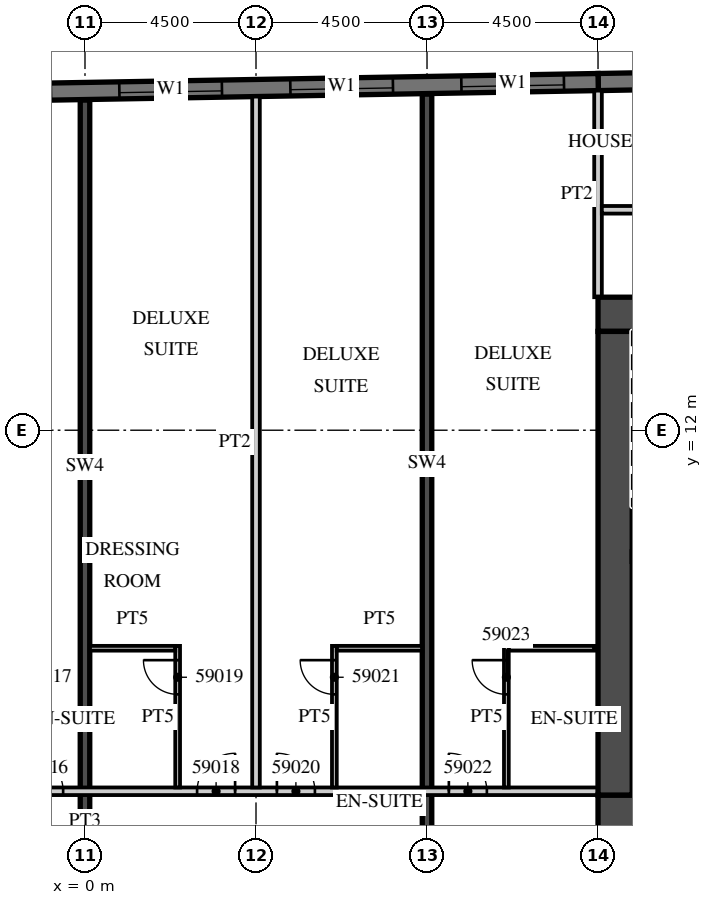
"""IFC4 building model, lengths in metres.
Left out: names, types, materials, properties, quantities, classifications, styles, units other than length and angle.
Written with IfcOpenShell. Run it as: python <this file> out.ifc"""

import sys

from ifc_helpers import new_model, si_unit, direction, frame, frame_2d, origin, place, context, subcontext, project, spatial, rectangle, extrude, element, fill, save


model = new_model("IFC4")
c1 = context("Model", 3, precision=1e-05, world=origin(), true_north=direction((0.0, 1.0)))
c2 = subcontext(c1, "Body", "Model", "MODEL_VIEW")
j1 = project(units=[si_unit("LENGTHUNIT", "METRE"), si_unit("PLANEANGLEUNIT", "RADIAN")], contexts=[c1])
p1 = place(None, origin())
s1 = spatial("IfcSite", under=j1, at=p1, CompositionType="ELEMENT")
p2 = place(p1, origin())
s2 = spatial("IfcBuilding", under=s1, at=p2, CompositionType="ELEMENT")
p3 = place(p2, frame((0.0, 0.0, 240.8)))
s3 = spatial("IfcBuildingStorey", under=s2, at=p3, CompositionType="ELEMENT", Elevation=240.8)
p4 = place(p3, frame((0.0, 1.4, 0.0), z_axis=(0.0, 0.0, 1.0), x_axis=(0.0, 1.0, 0.0)))
e1 = element("IfcWall", 1, at=p4, inside=s3, PredefinedType="SHEAR", context=c2, shape_type="SweptSolid", body=[
    extrude(rectangle(XDim=19.289, YDim=0.25, at=frame_2d((9.644, 0.0))), origin(), (0.0, 0.0, 1.0), 3.3),
])
p5 = place(p3, frame((9.0, 1.4, 0.0), z_axis=(0.0, 0.0, 1.0), x_axis=(0.0, 1.0, 0.0)))
e2 = element("IfcWall", 2, at=p5, inside=s3, PredefinedType="SHEAR", context=c2, shape_type="SweptSolid", body=[
    extrude(rectangle(XDim=19.446, YDim=0.25, at=frame_2d((9.723, 0.0))), origin(), (0.0, 0.0, 1.0), 3.3),
])
p6 = place(p3, frame((31.504, 21.476, 0.0), z_axis=(0.0, 0.0, 1.0), x_axis=(-0.999847677887, -0.017453395744, 0.0)))
e3 = element("IfcWall", 3, at=p6, inside=s3, PredefinedType="SOLIDWALL", context=c2, shape_type="SweptSolid", body=[
    extrude(rectangle(XDim=18.003, YDim=0.45, at=frame_2d((9.001, 0.0))), origin(), (0.0, 0.0, 1.0), 3.02),
])
p7 = place(p3, frame((13.504, 21.161, 0.0), z_axis=(0.0, 0.0, 1.0), x_axis=(-0.999847763257, -0.017448504532, 0.0)))
e4 = element("IfcWall", 4, at=p7, inside=s3, PredefinedType="SOLIDWALL", context=c2, shape_type="SweptSolid", body=[
    extrude(rectangle(XDim=46.859, YDim=0.45, at=frame_2d((23.43, 0.0))), origin(), (0.0, 0.0, 1.0), 3.02),
])
p8 = place(p7, frame((0.9, 0.0, 0.45)))
e5 = element("IfcOpeningElement", 5, at=p8, cuts=e4, PredefinedType="OPENING", context=c2, shape_type="SweptSolid", body=[
    extrude(rectangle(XDim=2.7, YDim=2.25, at=frame_2d((1.35, 1.125))), frame((0.0, 0.235, 0.0), z_axis=(0.0, -1.0, 0.0), x_axis=(1.0, 0.0, 0.0)), (0.0, 0.0, 1.0), 0.47),
])
p9 = place(p7, frame((5.401, 0.0, 0.45)))
e6 = element("IfcOpeningElement", 6, at=p9, cuts=e4, PredefinedType="OPENING", context=c2, shape_type="SweptSolid", body=[
    extrude(rectangle(XDim=2.7, YDim=2.25, at=frame_2d((1.35, 1.125))), frame((0.0, 0.235, 0.0), z_axis=(0.0, -1.0, 0.0), x_axis=(1.0, 0.0, 0.0)), (0.0, 0.0, 1.0), 0.47),
])
p10 = place(p7, frame((9.902, 0.0, 0.45)))
e7 = element("IfcOpeningElement", 7, at=p10, cuts=e4, PredefinedType="OPENING", context=c2, shape_type="SweptSolid", body=[
    extrude(rectangle(XDim=2.7, YDim=2.25, at=frame_2d((1.35, 1.125))), frame((0.0, 0.235, 0.0), z_axis=(0.0, -1.0, 0.0), x_axis=(1.0, 0.0, 0.0)), (0.0, 0.0, 1.0), 0.47),
])
p11 = place(p7, frame((14.402, 0.0, 0.45)))
e8 = element("IfcOpeningElement", 8, at=p11, cuts=e4, PredefinedType="OPENING", context=c2, shape_type="SweptSolid", body=[
    extrude(rectangle(XDim=2.7, YDim=2.25, at=frame_2d((1.35, 1.125))), frame((0.0, 0.235, 0.0), z_axis=(0.0, -1.0, 0.0), x_axis=(1.0, 0.0, 0.0)), (0.0, 0.0, 1.0), 0.47),
])
p12 = place(p7, frame((18.903, 0.0, 0.45)))
e9 = element("IfcOpeningElement", 9, at=p12, cuts=e4, PredefinedType="OPENING", context=c2, shape_type="SweptSolid", body=[
    extrude(rectangle(XDim=2.7, YDim=2.25, at=frame_2d((1.35, 1.125))), frame((0.0, 0.235, 0.0), z_axis=(0.0, -1.0, 0.0), x_axis=(1.0, 0.0, 0.0)), (0.0, 0.0, 1.0), 0.47),
])
p13 = place(p7, frame((23.404, 0.0, 0.45)))
e10 = element("IfcOpeningElement", 10, at=p13, cuts=e4, PredefinedType="OPENING", context=c2, shape_type="SweptSolid", body=[
    extrude(rectangle(XDim=2.7, YDim=2.25, at=frame_2d((1.35, 1.125))), frame((0.0, 0.235, 0.0), z_axis=(0.0, -1.0, 0.0), x_axis=(1.0, 0.0, 0.0)), (0.0, 0.0, 1.0), 0.47),
])
p14 = place(p7, frame((27.904, 0.0, 0.45)))
e11 = element("IfcOpeningElement", 11, at=p14, cuts=e4, PredefinedType="OPENING", context=c2, shape_type="SweptSolid", body=[
    extrude(rectangle(XDim=2.7, YDim=2.25, at=frame_2d((1.35, 1.125))), frame((0.0, 0.235, 0.0), z_axis=(0.0, -1.0, 0.0), x_axis=(1.0, 0.0, 0.0)), (0.0, 0.0, 1.0), 0.47),
])
p15 = place(p7, frame((32.405, 0.0, 0.45)))
e12 = element("IfcOpeningElement", 12, at=p15, cuts=e4, PredefinedType="OPENING", context=c2, shape_type="SweptSolid", body=[
    extrude(rectangle(XDim=2.7, YDim=2.25, at=frame_2d((1.35, 1.125))), frame((0.0, 0.235, 0.0), z_axis=(0.0, -1.0, 0.0), x_axis=(1.0, 0.0, 0.0)), (0.0, 0.0, 1.0), 0.47),
])
p16 = place(p7, frame((36.906, 0.0, 0.45)))
e13 = element("IfcOpeningElement", 13, at=p16, cuts=e4, PredefinedType="OPENING", context=c2, shape_type="SweptSolid", body=[
    extrude(rectangle(XDim=2.7, YDim=2.25, at=frame_2d((1.35, 1.125))), frame((0.0, 0.235, 0.0), z_axis=(0.0, -1.0, 0.0), x_axis=(1.0, 0.0, 0.0)), (0.0, 0.0, 1.0), 0.47),
])
p17 = place(p7, frame((41.406, 0.0, 0.45)))
e14 = element("IfcOpeningElement", 14, at=p17, cuts=e4, PredefinedType="OPENING", context=c2, shape_type="SweptSolid", body=[
    extrude(rectangle(XDim=2.7, YDim=2.25, at=frame_2d((1.35, 1.125))), frame((0.0, 0.235, 0.0), z_axis=(0.0, -1.0, 0.0), x_axis=(1.0, 0.0, 0.0)), (0.0, 0.0, 1.0), 0.47),
])
p18 = place(p3, frame((13.5, 15.5, 0.0), z_axis=(0.0, 0.0, 1.0), x_axis=(0.0, 1.0, 0.0)))
e15 = element("IfcWall", 15, at=p18, inside=s3, PredefinedType="PARTITIONING", context=c2, shape_type="SweptSolid", body=[
    extrude(rectangle(XDim=5.436, YDim=0.2, at=frame_2d((2.718, 0.0))), origin(), (0.0, 0.0, 1.0), 3.02),
])
p19 = place(p3, frame((-13.5, 2.5, 0.0), z_axis=(0.0, 0.0, 1.0), x_axis=(1.0, 0.0, 0.0)))
e16 = element("IfcWall", 16, at=p19, inside=s3, PredefinedType="PARTITIONING", context=c2, shape_type="SweptSolid", body=[
    extrude(rectangle(XDim=27.0, YDim=0.2, at=frame_2d((13.5, 0.0))), origin(), (0.0, 0.0, 1.0), 3.02),
])
p20 = place(p19, frame((2.925, 0.0, 0.0)))
e17 = element("IfcOpeningElement", 17, at=p20, cuts=e16, PredefinedType="OPENING", context=c2, shape_type="SweptSolid", body=[
    extrude(rectangle(XDim=1.0, YDim=2.1, at=frame_2d((0.5, 1.05))), frame((0.0, 0.11, 0.0), z_axis=(0.0, -1.0, 0.0), x_axis=(1.0, 0.0, 0.0)), (0.0, 0.0, 1.0), 0.22),
])
p21 = place(p19, frame((7.45, 0.0, 0.0)))
e18 = element("IfcOpeningElement", 18, at=p21, cuts=e16, PredefinedType="OPENING", context=c2, shape_type="SweptSolid", body=[
    extrude(rectangle(XDim=1.0, YDim=2.1, at=frame_2d((0.5, 1.05))), frame((0.0, 0.11, 0.0), z_axis=(0.0, -1.0, 0.0), x_axis=(1.0, 0.0, 0.0)), (0.0, 0.0, 1.0), 0.22),
])
p22 = place(p19, frame((11.925, 0.0, 0.0)))
e19 = element("IfcOpeningElement", 19, at=p22, cuts=e16, PredefinedType="OPENING", context=c2, shape_type="SweptSolid", body=[
    extrude(rectangle(XDim=1.0, YDim=2.1, at=frame_2d((0.5, 1.05))), frame((0.0, 0.11, 0.0), z_axis=(0.0, -1.0, 0.0), x_axis=(1.0, 0.0, 0.0)), (0.0, 0.0, 1.0), 0.22),
])
p23 = place(p19, frame((16.45, 0.0, 0.0)))
e20 = element("IfcOpeningElement", 20, at=p23, cuts=e16, PredefinedType="OPENING", context=c2, shape_type="SweptSolid", body=[
    extrude(rectangle(XDim=1.0, YDim=2.1, at=frame_2d((0.5, 1.05))), frame((0.0, 0.11, 0.0), z_axis=(0.0, -1.0, 0.0), x_axis=(1.0, 0.0, 0.0)), (0.0, 0.0, 1.0), 0.22),
])
p24 = place(p19, frame((18.55, 0.0, 0.0)))
e21 = element("IfcOpeningElement", 21, at=p24, cuts=e16, PredefinedType="OPENING", context=c2, shape_type="SweptSolid", body=[
    extrude(rectangle(XDim=1.0, YDim=2.1, at=frame_2d((0.5, 1.05))), frame((0.0, 0.11, 0.0), z_axis=(0.0, -1.0, 0.0), x_axis=(1.0, 0.0, 0.0)), (0.0, 0.0, 1.0), 0.22),
])
p25 = place(p19, frame((23.075, 0.0, 0.0)))
e22 = element("IfcOpeningElement", 22, at=p25, cuts=e16, PredefinedType="OPENING", context=c2, shape_type="SweptSolid", body=[
    extrude(rectangle(XDim=1.0, YDim=2.1, at=frame_2d((0.5, 1.05))), frame((0.0, 0.11, 0.0), z_axis=(0.0, -1.0, 0.0), x_axis=(1.0, 0.0, 0.0)), (0.0, 0.0, 1.0), 0.22),
])
p26 = place(p3, frame((4.5, 2.6, 0.0), z_axis=(0.0, 0.0, 1.0), x_axis=(0.0, 1.0, 0.0)))
e23 = element("IfcWall", 23, at=p26, inside=s3, PredefinedType="PARTITIONING", context=c2, shape_type="SweptSolid", body=[
    extrude(rectangle(XDim=18.179, YDim=0.2, at=frame_2d((9.089, 0.0))), origin(), (0.0, 0.0, 1.0), 3.02),
])
p27 = place(p3, frame((2.438, 2.6, 0.0), z_axis=(0.0, 0.0, 1.0), x_axis=(0.0, 1.0, 0.0)))
e24 = element("IfcWall", 24, at=p27, inside=s3, PredefinedType="PARTITIONING", context=c2, shape_type="SweptSolid", body=[
    extrude(rectangle(XDim=3.725, YDim=0.125, at=frame_2d((1.862, 0.0))), origin(), (0.0, 0.0, 1.0), 3.02),
])
p28 = place(p27, frame((2.45, 0.0, 0.0)))
e25 = element("IfcOpeningElement", 25, at=p28, cuts=e24, PredefinedType="OPENING", context=c2, shape_type="SweptSolid", body=[
    extrude(rectangle(XDim=0.9, YDim=2.1, at=frame_2d((0.45, 1.05))), frame((0.0, 0.073, 0.0), z_axis=(0.0, -1.0, 0.0), x_axis=(1.0, 0.0, 0.0)), (0.0, 0.0, 1.0), 0.145),
])
p29 = place(p3, frame((0.125, 6.263, 0.0), z_axis=(0.0, 0.0, 1.0), x_axis=(1.0, 0.0, 0.0)))
e26 = element("IfcWall", 26, at=p29, inside=s3, PredefinedType="PARTITIONING", context=c2, shape_type="SweptSolid", body=[
    extrude(rectangle(XDim=2.25, YDim=0.125, at=frame_2d((1.125, 0.0))), origin(), (0.0, 0.0, 1.0), 3.02),
])
p30 = place(p3, frame((6.562, 2.6, 0.0), z_axis=(0.0, 0.0, 1.0), x_axis=(0.0, 1.0, 0.0)))
e27 = element("IfcWall", 27, at=p30, inside=s3, PredefinedType="PARTITIONING", context=c2, shape_type="SweptSolid", body=[
    extrude(rectangle(XDim=3.725, YDim=0.125, at=frame_2d((1.862, 0.0))), origin(), (0.0, 0.0, 1.0), 3.02),
])
p31 = place(p30, frame((2.45, 0.0, 0.0)))
e28 = element("IfcOpeningElement", 28, at=p31, cuts=e27, PredefinedType="OPENING", context=c2, shape_type="SweptSolid", body=[
    extrude(rectangle(XDim=0.9, YDim=2.1, at=frame_2d((0.45, 1.05))), frame((0.0, 0.073, 0.0), z_axis=(0.0, -1.0, 0.0), x_axis=(1.0, 0.0, 0.0)), (0.0, 0.0, 1.0), 0.145),
])
p32 = place(p3, frame((6.625, 6.263, 0.0), z_axis=(0.0, 0.0, 1.0), x_axis=(1.0, 0.0, 0.0)))
e29 = element("IfcWall", 29, at=p32, inside=s3, PredefinedType="PARTITIONING", context=c2, shape_type="SweptSolid", body=[
    extrude(rectangle(XDim=2.25, YDim=0.125, at=frame_2d((1.125, 0.0))), origin(), (0.0, 0.0, 1.0), 3.02),
])
p33 = place(p3, frame((11.088, 2.6, 0.0), z_axis=(0.0, 0.0, 1.0), x_axis=(0.0, 1.0, 0.0)))
e30 = element("IfcWall", 30, at=p33, inside=s3, PredefinedType="PARTITIONING", context=c2, shape_type="SweptSolid", body=[
    extrude(rectangle(XDim=3.725, YDim=0.125, at=frame_2d((1.862, 0.0))), origin(), (0.0, 0.0, 1.0), 3.02),
])
p34 = place(p33, frame((2.45, 0.0, 0.0)))
e31 = element("IfcOpeningElement", 31, at=p34, cuts=e30, PredefinedType="OPENING", context=c2, shape_type="SweptSolid", body=[
    extrude(rectangle(XDim=0.9, YDim=2.1, at=frame_2d((0.45, 1.05))), frame((0.0, 0.073, 0.0), z_axis=(0.0, -1.0, 0.0), x_axis=(1.0, 0.0, 0.0)), (0.0, 0.0, 1.0), 0.145),
])
p35 = place(p3, frame((11.15, 6.263, 0.0), z_axis=(0.0, 0.0, 1.0), x_axis=(1.0, 0.0, 0.0)))
e32 = element("IfcWall", 32, at=p35, inside=s3, PredefinedType="PARTITIONING", context=c2, shape_type="SweptSolid", body=[
    extrude(rectangle(XDim=2.25, YDim=0.125, at=frame_2d((1.125, 0.0))), origin(), (0.0, 0.0, 1.0), 3.02),
])
p36 = place(p3, frame((13.5, 1.95, 0.0), z_axis=(0.0, 0.0, 1.0), x_axis=(1.0, 0.0, 0.0)))
e33 = element("IfcWall", 33, at=p36, inside=s3, PredefinedType="SHEAR", context=c2, shape_type="SweptSolid", body=[
    extrude(rectangle(XDim=18.0, YDim=0.9, at=frame_2d((9.0, 0.0))), origin(), (0.0, 0.0, 1.0), 3.02),
])
p37 = place(p36, frame((1.475, 0.0, 0.0)))
e34 = element("IfcOpeningElement", 34, at=p37, cuts=e33, PredefinedType="OPENING", context=c2, shape_type="SweptSolid", body=[
    extrude(rectangle(XDim=1.8, YDim=2.1, at=frame_2d((0.9, 1.05))), frame((0.0, 0.46, 0.0), z_axis=(0.0, -1.0, 0.0), x_axis=(1.0, 0.0, 0.0)), (0.0, 0.0, 1.0), 0.92),
])
p38 = place(p3, frame((13.5, 15.05, 0.0), z_axis=(0.0, 0.0, 1.0), x_axis=(1.0, 0.0, 0.0)))
e35 = element("IfcWall", 35, at=p38, inside=s3, PredefinedType="SHEAR", context=c2, shape_type="SweptSolid", body=[
    extrude(rectangle(XDim=6.8, YDim=0.9, at=frame_2d((3.4, 0.0))), origin(), (0.0, 0.0, 1.0), 3.02),
])
p39 = place(p38, frame((4.725, 0.0, 0.0)))
e36 = element("IfcOpeningElement", 36, at=p39, cuts=e35, PredefinedType="OPENING", context=c2, shape_type="SweptSolid", body=[
    extrude(rectangle(XDim=1.2, YDim=2.1, at=frame_2d((0.6, 1.05))), frame((0.0, 0.46, 0.0), z_axis=(0.0, -1.0, 0.0), x_axis=(1.0, 0.0, 0.0)), (0.0, 0.0, 1.0), 0.92),
])
p40 = place(p3, frame((13.95, 2.4, 0.0), z_axis=(0.0, 0.0, 1.0), x_axis=(0.0, 1.0, 0.0)))
e37 = element("IfcWall", 37, at=p40, inside=s3, PredefinedType="SHEAR", context=c2, shape_type="SweptSolid", body=[
    extrude(rectangle(XDim=12.2, YDim=0.9, at=frame_2d((6.1, 0.0))), origin(), (0.0, 0.0, 1.0), 3.02),
])
p41 = place(p3, frame((13.6, 17.8, 0.0), z_axis=(0.0, 0.0, 1.0), x_axis=(1.0, 0.0, 0.0)))
e38 = element("IfcWall", 38, at=p41, inside=s3, PredefinedType="PARTITIONING", context=c2, shape_type="SweptSolid", body=[
    extrude(rectangle(XDim=28.657, YDim=0.2, at=frame_2d((14.329, 0.0))), origin(), (0.0, 0.0, 1.0), 3.02),
])
p42 = place(p41, frame((17.812, 0.0, 0.0)))
e39 = element("IfcOpeningElement", 39, at=p42, cuts=e38, PredefinedType="OPENING", context=c2, shape_type="SweptSolid", body=[
    extrude(rectangle(XDim=0.9, YDim=2.1, at=frame_2d((0.45, 1.05))), frame((0.0, 0.11, 0.0), z_axis=(0.0, -1.0, 0.0), x_axis=(1.0, 0.0, 0.0)), (0.0, 0.0, 1.0), 0.22),
])
p43 = place(p41, frame((9.512, 0.0, 0.0)))
e40 = element("IfcOpeningElement", 40, at=p43, cuts=e38, PredefinedType="OPENING", context=c2, shape_type="SweptSolid", body=[
    extrude(rectangle(XDim=0.9, YDim=2.1, at=frame_2d((0.45, 1.05))), frame((0.0, 0.11, 0.0), z_axis=(0.0, -1.0, 0.0), x_axis=(1.0, 0.0, 0.0)), (0.0, 0.0, 1.0), 0.22),
])
p44 = place(p8, origin())
e41 = element("IfcWindow", 41, at=p44, inside=s3, PartitioningType="SINGLE_PANEL", PredefinedType="WINDOW", context=c2, shape_type="SweptSolid", body=[
    extrude(rectangle(XDim=2.7, YDim=2.25, at=frame_2d((1.35, 1.125))), frame((0.0, 0.09, 0.0), z_axis=(0.0, -1.0, 0.0), x_axis=(1.0, 0.0, 0.0)), (0.0, 0.0, 1.0), 0.06),
])
fill(e5, e41)
p45 = place(p9, origin())
e42 = element("IfcWindow", 42, at=p45, inside=s3, PartitioningType="SINGLE_PANEL", PredefinedType="WINDOW", context=c2, shape_type="SweptSolid", body=[
    extrude(rectangle(XDim=2.7, YDim=2.25, at=frame_2d((1.35, 1.125))), frame((0.0, 0.09, 0.0), z_axis=(0.0, -1.0, 0.0), x_axis=(1.0, 0.0, 0.0)), (0.0, 0.0, 1.0), 0.06),
])
fill(e6, e42)
p46 = place(p10, origin())
e43 = element("IfcWindow", 43, at=p46, inside=s3, PartitioningType="SINGLE_PANEL", PredefinedType="WINDOW", context=c2, shape_type="SweptSolid", body=[
    extrude(rectangle(XDim=2.7, YDim=2.25, at=frame_2d((1.35, 1.125))), frame((0.0, 0.09, 0.0), z_axis=(0.0, -1.0, 0.0), x_axis=(1.0, 0.0, 0.0)), (0.0, 0.0, 1.0), 0.06),
])
fill(e7, e43)
p47 = place(p22, origin())
e44 = element("IfcDoor", 44, at=p47, inside=s3, OperationType="SINGLE_SWING_LEFT", PredefinedType="DOOR", context=c2, shape_type="SweptSolid", body=[
    extrude(rectangle(XDim=1.0, YDim=2.1, at=frame_2d((0.5, 1.05))), frame((0.0, 0.025, 0.0), z_axis=(0.0, -1.0, 0.0), x_axis=(1.0, 0.0, 0.0)), (0.0, 0.0, 1.0), 0.05),
])
fill(e19, e44)
p48 = place(p23, origin())
e45 = element("IfcDoor", 45, at=p48, inside=s3, OperationType="SINGLE_SWING_RIGHT", PredefinedType="DOOR", context=c2, shape_type="SweptSolid", body=[
    extrude(rectangle(XDim=1.0, YDim=2.1, at=frame_2d((0.5, 1.05))), frame((0.0, 0.025, 0.0), z_axis=(0.0, -1.0, 0.0), x_axis=(1.0, 0.0, 0.0)), (0.0, 0.0, 1.0), 0.05),
])
fill(e20, e45)
p49 = place(p28, origin())
e46 = element("IfcDoor", 46, at=p49, inside=s3, OperationType="SINGLE_SWING_RIGHT", PredefinedType="DOOR", context=c2, shape_type="SweptSolid", body=[
    extrude(rectangle(XDim=0.9, YDim=2.1, at=frame_2d((0.45, 1.05))), frame((0.0, 0.025, 0.0), z_axis=(0.0, -1.0, 0.0), x_axis=(1.0, 0.0, 0.0)), (0.0, 0.0, 1.0), 0.05),
])
fill(e25, e46)
p50 = place(p24, origin())
e47 = element("IfcDoor", 47, at=p50, inside=s3, OperationType="SINGLE_SWING_LEFT", PredefinedType="DOOR", context=c2, shape_type="SweptSolid", body=[
    extrude(rectangle(XDim=1.0, YDim=2.1, at=frame_2d((0.5, 1.05))), frame((0.0, 0.025, 0.0), z_axis=(0.0, -1.0, 0.0), x_axis=(1.0, 0.0, 0.0)), (0.0, 0.0, 1.0), 0.05),
])
fill(e21, e47)
p51 = place(p31, origin())
e48 = element("IfcDoor", 48, at=p51, inside=s3, OperationType="SINGLE_SWING_RIGHT", PredefinedType="DOOR", context=c2, shape_type="SweptSolid", body=[
    extrude(rectangle(XDim=0.9, YDim=2.1, at=frame_2d((0.45, 1.05))), frame((0.0, 0.025, 0.0), z_axis=(0.0, -1.0, 0.0), x_axis=(1.0, 0.0, 0.0)), (0.0, 0.0, 1.0), 0.05),
])
fill(e28, e48)
p52 = place(p25, origin())
e49 = element("IfcDoor", 49, at=p52, inside=s3, OperationType="SINGLE_SWING_LEFT", PredefinedType="DOOR", context=c2, shape_type="SweptSolid", body=[
    extrude(rectangle(XDim=1.0, YDim=2.1, at=frame_2d((0.5, 1.05))), frame((0.0, 0.025, 0.0), z_axis=(0.0, -1.0, 0.0), x_axis=(1.0, 0.0, 0.0)), (0.0, 0.0, 1.0), 0.05),
])
fill(e22, e49)
p53 = place(p34, origin())
e50 = element("IfcDoor", 50, at=p53, inside=s3, OperationType="SINGLE_SWING_RIGHT", PredefinedType="DOOR", context=c2, shape_type="SweptSolid", body=[
    extrude(rectangle(XDim=0.9, YDim=2.1, at=frame_2d((0.45, 1.05))), frame((0.0, 0.025, 0.0), z_axis=(0.0, -1.0, 0.0), x_axis=(1.0, 0.0, 0.0)), (0.0, 0.0, 1.0), 0.05),
])
fill(e31, e50)
save(model, sys.argv[1])
